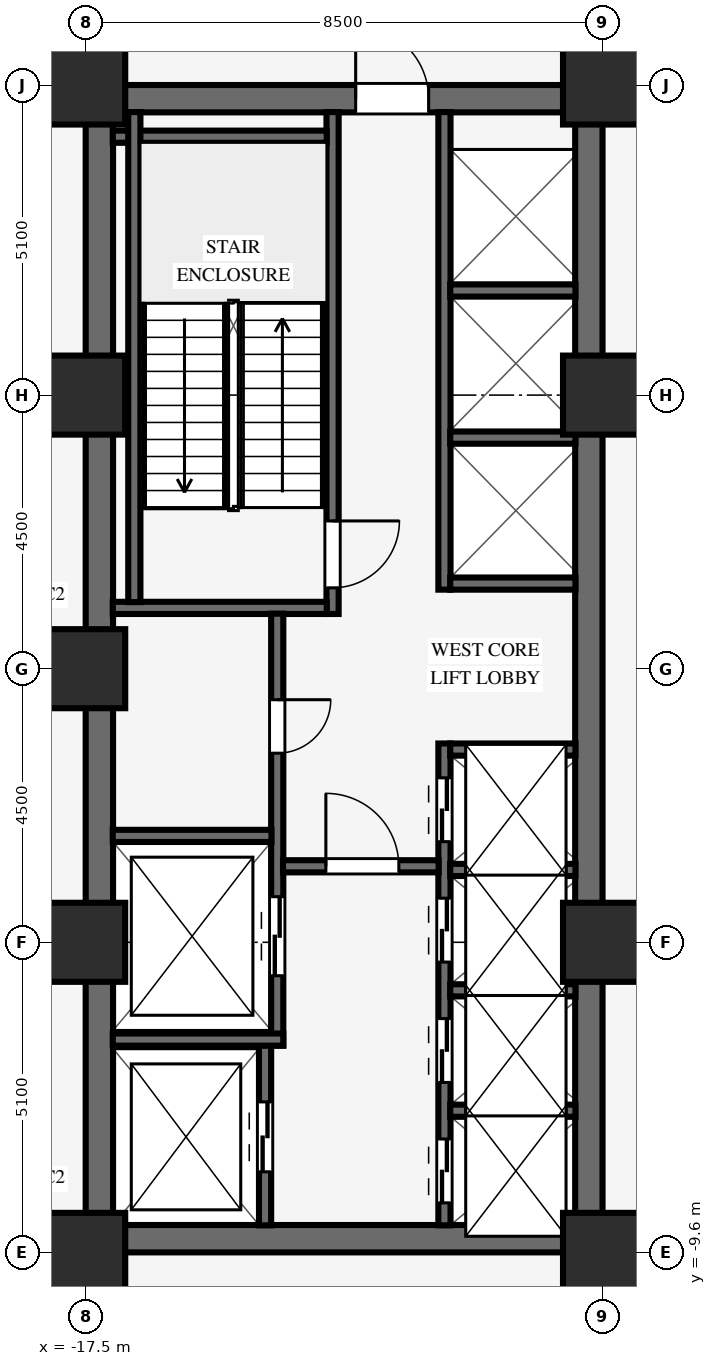
"""IFC4 building model, lengths in metres.
Left out: names, types, materials, properties, quantities, classifications, styles, units other than length and angle.
Written with IfcOpenShell. Run it as: python <this file> out.ifc"""

import sys

from ifc_helpers import new_model, si_unit, direction, frame, frame_2d, origin, origin_2d, place, context, subcontext, project, spatial, rectangle, extrude, source, transform, mapped, element, fill, save


model = new_model("IFC4")
c1 = context("Model", 3, precision=1e-05, world=origin(), true_north=direction((0.0, 1.0)))
c2 = subcontext(c1, "Body", "Model", "MODEL_VIEW")
j1 = project(units=[si_unit("LENGTHUNIT", "METRE"), si_unit("PLANEANGLEUNIT", "RADIAN")], contexts=[c1])
p1 = place(None, origin())
s1 = spatial("IfcSite", under=j1, at=p1, CompositionType="ELEMENT")
p2 = place(p1, origin())
s2 = spatial("IfcBuilding", under=s1, at=p2, CompositionType="ELEMENT")
p3 = place(p2, frame((0.0, 0.0, 13.8)))
s3 = spatial("IfcBuildingStorey", under=s2, at=p3, CompositionType="ELEMENT", Elevation=13.8)
p4 = place(p3, frame((-17.5, -9.375, 0.0), z_axis=(0.0, 0.0, 1.0), x_axis=(1.0, 0.0, 0.0)))
e1 = element("IfcWall", 1, at=p4, inside=s3, PredefinedType="SHEAR", context=c2, shape_type="SweptSolid", body=[
    extrude(rectangle(XDim=8.5, YDim=0.45, at=frame_2d((4.25, 0.0))), origin(), (0.0, 0.0, 1.0), 4.2),
])
p5 = place(p3, frame((-17.5, 9.375, 0.0), z_axis=(0.0, 0.0, 1.0), x_axis=(1.0, 0.0, 0.0)))
e2 = element("IfcWall", 2, at=p5, inside=s3, PredefinedType="SHEAR", context=c2, shape_type="SweptSolid", body=[
    extrude(rectangle(XDim=8.5, YDim=0.45, at=frame_2d((4.25, 0.0))), origin(), (0.0, 0.0, 1.0), 4.2),
])
p6 = place(p5, frame((4.44, 0.0, 0.0)))
e3 = element("IfcOpeningElement", 3, at=p6, cuts=e2, PredefinedType="OPENING", context=c2, shape_type="SweptSolid", body=[
    extrude(rectangle(XDim=1.2, YDim=2.15, at=frame_2d((0.6, 1.075))), frame((0.0, 0.235, 0.0), z_axis=(0.0, -1.0, 0.0), x_axis=(1.0, 0.0, 0.0)), (0.0, 0.0, 1.0), 0.47),
])
for number, where, z_axis, x_axis in (
    (4, (-17.275, -9.155, 0.0), (0.0, 0.0, 1.0), (0.0, 1.0, 0.0)),
    (5, (-9.225, -9.155, 0.0), (0.0, 0.0, 1.0), (0.0, 1.0, 0.0)),
):
    element("IfcWall", number, at=place(p3, frame(where, z_axis=z_axis, x_axis=x_axis)), inside=s3, PredefinedType="SHEAR", context=c2, shape_type="SweptSolid", body=[
        extrude(rectangle(XDim=18.31, YDim=0.45, at=frame_2d((9.155, 0.0))), origin(), (0.0, 0.0, 1.0), 4.2),
    ])
for number, where, z_axis, x_axis in (
    (6, (-17.5, -9.6, 0.0), (0.0, 0.0, 1.0), (1.0, 0.0, 0.0)),
    (7, (-17.5, -4.5, 0.0), (0.0, 0.0, 1.0), (1.0, 0.0, 0.0)),
    (8, (-17.5, 4.5, 0.0), (0.0, 0.0, 1.0), (1.0, 0.0, 0.0)),
    (9, (-17.5, 9.6, 0.0), (0.0, 0.0, 1.0), (1.0, 0.0, 0.0)),
    (10, (-9.0, -9.6, 0.0), (0.0, 0.0, 1.0), (1.0, 0.0, 0.0)),
    (11, (-9.0, -4.5, 0.0), (0.0, 0.0, 1.0), (1.0, 0.0, 0.0)),
    (12, (-9.0, 4.5, 0.0), (0.0, 0.0, 1.0), (1.0, 0.0, 0.0)),
    (13, (-9.0, 9.6, 0.0), (0.0, 0.0, 1.0), (1.0, 0.0, 0.0)),
    (14, (-17.5, 0.0, 0.0), (0.0, 0.0, 1.0), (1.0, 0.0, 0.0)),
):
    element("IfcColumn", number, at=place(p3, frame(where, z_axis=z_axis, x_axis=x_axis)), inside=s3, PredefinedType="COLUMN", context=c2, shape_type="SweptSolid", body=[
        extrude(rectangle(XDim=1.3, YDim=1.3, at=origin_2d()), origin(), (0.0, 0.0, 1.0), 4.2),
    ])
p7 = place(p3, frame((-13.44, 0.9, 0.0), z_axis=(0.0, 0.0, 1.0), x_axis=(0.0, 1.0, 0.0)))
e15 = element("IfcWall", 15, at=p7, inside=s3, PredefinedType="SHEAR", context=c2, shape_type="SweptSolid", body=[
    extrude(rectangle(XDim=8.255, YDim=0.2, at=frame_2d((4.127, 0.0))), origin(), (0.0, 0.0, 1.0), 4.2),
])
p8 = place(p7, frame((1.53, 0.0, 0.0), z_axis=(0.0, 0.0, 1.0), x_axis=(-1.0, 0.0, 0.0)))
e16 = element("IfcOpeningElement", 16, at=p8, cuts=e15, PredefinedType="OPENING", context=c2, shape_type="SweptSolid", body=[
    extrude(rectangle(XDim=1.1, YDim=2.15, at=frame_2d((0.55, 1.075))), frame((0.0, 0.11, 0.0), z_axis=(0.0, -1.0, 0.0), x_axis=(1.0, 0.0, 0.0)), (0.0, 0.0, 1.0), 0.22),
])
for number, where, z_axis, x_axis in (
    (17, (-17.055, 1.0, 0.0), (0.0, 0.0, 1.0), (1.0, 0.0, 0.0)),
    (18, (-17.055, 8.75, 0.0), (0.0, 0.0, 1.0), (1.0, 0.0, 0.0)),
):
    element("IfcWall", number, at=place(p3, frame(where, z_axis=z_axis, x_axis=x_axis)), inside=s3, PredefinedType="SHEAR", context=c2, shape_type="SweptSolid", body=[
        extrude(rectangle(XDim=3.52, YDim=0.2, at=frame_2d((1.76, 0.0))), origin(), (0.0, 0.0, 1.0), 4.2),
    ])
p9 = place(p3, frame((-16.7, 1.095, 0.0), z_axis=(0.0, 0.0, 1.0), x_axis=(0.0, 1.0, 0.0)))
e19 = element("IfcWall", 19, at=p9, inside=s3, PredefinedType="SHEAR", context=c2, shape_type="SweptSolid", body=[
    extrude(rectangle(XDim=8.06, YDim=0.2, at=frame_2d((4.03, 0.0))), origin(), (0.0, 0.0, 1.0), 4.2),
])
p10 = place(p3, frame((-14.55, -9.155, 0.0), z_axis=(0.0, 0.0, 1.0), x_axis=(0.0, 1.0, 0.0)))
e20 = element("IfcWall", 20, at=p10, inside=s3, PredefinedType="SHEAR", context=c2, shape_type="SweptSolid", body=[
    extrude(rectangle(XDim=2.96, YDim=0.2, at=frame_2d((1.48, 0.0))), origin(), (0.0, 0.0, 1.0), 4.2),
])
p11 = place(p10, frame((0.88, 0.0, 0.0)))
e21 = element("IfcOpeningElement", 21, at=p11, cuts=e20, PredefinedType="OPENING", context=c2, shape_type="SweptSolid", body=[
    extrude(rectangle(XDim=1.15, YDim=2.15, at=frame_2d((0.575, 1.075))), frame((0.0, 0.11, 0.0), z_axis=(0.0, -1.0, 0.0), x_axis=(1.0, 0.0, 0.0)), (0.0, 0.0, 1.0), 0.22),
])
p12 = place(p3, frame((-14.35, -6.2, 0.0), z_axis=(0.0, 0.0, 1.0), x_axis=(0.0, 1.0, 0.0)))
e22 = element("IfcWall", 22, at=p12, inside=s3, PredefinedType="SHEAR", context=c2, shape_type="SweptSolid", body=[
    extrude(rectangle(XDim=7.105, YDim=0.2, at=frame_2d((3.552, 0.0))), origin(), (0.0, 0.0, 1.0), 4.2),
])
p13 = place(p12, frame((5.69, 0.0, 0.0), z_axis=(0.0, 0.0, 1.0), x_axis=(-1.0, 0.0, 0.0)))
e23 = element("IfcOpeningElement", 23, at=p13, cuts=e22, PredefinedType="OPENING", context=c2, shape_type="SweptSolid", body=[
    extrude(rectangle(XDim=0.88, YDim=2.1, at=frame_2d((0.44, 1.05))), frame((0.0, 0.11, 0.0), z_axis=(0.0, -1.0, 0.0), x_axis=(1.0, 0.0, 0.0)), (0.0, 0.0, 1.0), 0.22),
])
p14 = place(p12, frame((1.15, 0.0, 0.0)))
e24 = element("IfcOpeningElement", 24, at=p14, cuts=e22, PredefinedType="OPENING", context=c2, shape_type="SweptSolid", body=[
    extrude(rectangle(XDim=1.3, YDim=2.2, at=frame_2d((0.65, 1.1))), frame((0.0, 0.11, 0.0), z_axis=(0.0, -1.0, 0.0), x_axis=(1.0, 0.0, 0.0)), (0.0, 0.0, 1.0), 0.22),
])
p15 = place(p3, frame((-17.055, -6.1, 0.0), z_axis=(0.0, 0.0, 1.0), x_axis=(1.0, 0.0, 0.0)))
e25 = element("IfcWall", 25, at=p15, inside=s3, PredefinedType="SHEAR", context=c2, shape_type="SweptSolid", body=[
    extrude(rectangle(XDim=2.805, YDim=0.2, at=frame_2d((1.402, 0.0))), origin(), (0.0, 0.0, 1.0), 4.2),
])
p16 = place(p3, frame((-17.055, -2.75, 0.0), z_axis=(0.0, 0.0, 1.0), x_axis=(1.0, 0.0, 0.0)))
e26 = element("IfcWall", 26, at=p16, inside=s3, PredefinedType="SHEAR", context=c2, shape_type="SweptSolid", body=[
    extrude(rectangle(XDim=2.61, YDim=0.2, at=frame_2d((1.305, 0.0))), origin(), (0.0, 0.0, 1.0), 4.2),
])
p17 = place(p3, frame((-11.6, -9.155, 0.0), z_axis=(0.0, 0.0, 1.0), x_axis=(0.0, 1.0, 0.0)))
e27 = element("IfcWall", 27, at=p17, inside=s3, PredefinedType="SHEAR", context=c2, shape_type="SweptSolid", body=[
    extrude(rectangle(XDim=7.925, YDim=0.2, at=frame_2d((3.962, 0.0))), origin(), (0.0, 0.0, 1.0), 4.2),
])
p18 = place(p17, frame((0.37, 0.0, 0.0)))
e28 = element("IfcOpeningElement", 28, at=p18, cuts=e27, PredefinedType="OPENING", context=c2, shape_type="SweptSolid", body=[
    extrude(rectangle(XDim=1.05, YDim=2.15, at=frame_2d((0.525, 1.075))), frame((0.0, 0.11, 0.0), z_axis=(0.0, -1.0, 0.0), x_axis=(1.0, 0.0, 0.0)), (0.0, 0.0, 1.0), 0.22),
])
p19 = place(p17, frame((2.35, 0.0, 0.0)))
e29 = element("IfcOpeningElement", 29, at=p19, cuts=e27, PredefinedType="OPENING", context=c2, shape_type="SweptSolid", body=[
    extrude(rectangle(XDim=1.05, YDim=2.15, at=frame_2d((0.525, 1.075))), frame((0.0, 0.11, 0.0), z_axis=(0.0, -1.0, 0.0), x_axis=(1.0, 0.0, 0.0)), (0.0, 0.0, 1.0), 0.22),
])
p20 = place(p17, frame((4.33, 0.0, 0.0)))
e30 = element("IfcOpeningElement", 30, at=p20, cuts=e27, PredefinedType="OPENING", context=c2, shape_type="SweptSolid", body=[
    extrude(rectangle(XDim=1.05, YDim=2.15, at=frame_2d((0.525, 1.075))), frame((0.0, 0.11, 0.0), z_axis=(0.0, -1.0, 0.0), x_axis=(1.0, 0.0, 0.0)), (0.0, 0.0, 1.0), 0.22),
])
p21 = place(p17, frame((6.31, 0.0, 0.0)))
e31 = element("IfcOpeningElement", 31, at=p21, cuts=e27, PredefinedType="OPENING", context=c2, shape_type="SweptSolid", body=[
    extrude(rectangle(XDim=1.05, YDim=2.15, at=frame_2d((0.525, 1.075))), frame((0.0, 0.11, 0.0), z_axis=(0.0, -1.0, 0.0), x_axis=(1.0, 0.0, 0.0)), (0.0, 0.0, 1.0), 0.22),
])
p22 = place(p3, frame((-14.255, -3.25, 0.0), z_axis=(0.0, 0.0, 1.0), x_axis=(1.0, 0.0, 0.0)))
e32 = element("IfcWall", 32, at=p22, inside=s3, PredefinedType="SHEAR", context=c2, shape_type="SweptSolid", body=[
    extrude(rectangle(XDim=2.56, YDim=0.2, at=frame_2d((1.28, 0.0))), origin(), (0.0, 0.0, 1.0), 4.2),
])
p23 = place(p22, frame((0.705, 0.0, 0.0)))
e33 = element("IfcOpeningElement", 33, at=p23, cuts=e32, PredefinedType="OPENING", context=c2, shape_type="SweptSolid", body=[
    extrude(rectangle(XDim=1.2, YDim=2.15, at=frame_2d((0.6, 1.075))), frame((0.0, 0.11, 0.0), z_axis=(0.0, -1.0, 0.0), x_axis=(1.0, 0.0, 0.0)), (0.0, 0.0, 1.0), 0.22),
])
for number, where, z_axis, x_axis in (
    (34, (-11.505, -7.27, 0.0), (0.0, 0.0, 1.0), (1.0, 0.0, 0.0)),
    (35, (-11.505, -5.29, 0.0), (0.0, 0.0, 1.0), (1.0, 0.0, 0.0)),
    (36, (-11.505, -3.31, 0.0), (0.0, 0.0, 1.0), (1.0, 0.0, 0.0)),
    (37, (-11.505, -1.33, 0.0), (0.0, 0.0, 1.0), (1.0, 0.0, 0.0)),
):
    element("IfcWall", number, at=place(p3, frame(where, z_axis=z_axis, x_axis=x_axis)), inside=s3, PredefinedType="SHEAR", context=c2, shape_type="SweptSolid", body=[
        extrude(rectangle(XDim=2.06, YDim=0.2, at=frame_2d((1.03, 0.0))), origin(), (0.0, 0.0, 1.0), 4.2),
    ])
p24 = place(p3, frame((-11.6, 1.3, 0.0), z_axis=(0.0, 0.0, 1.0), x_axis=(0.0, 1.0, 0.0)))
e38 = element("IfcWall", 38, at=p24, inside=s3, PredefinedType="SHEAR", context=c2, shape_type="SweptSolid", body=[
    extrude(rectangle(XDim=7.855, YDim=0.2, at=frame_2d((3.927, 0.0))), origin(), (0.0, 0.0, 1.0), 4.2),
])
for number, where, z_axis, x_axis in (
    (39, (-11.505, 1.4, 0.0), (0.0, 0.0, 1.0), (1.0, 0.0, 0.0)),
    (40, (-11.505, 3.8, 0.0), (0.0, 0.0, 1.0), (1.0, 0.0, 0.0)),
    (41, (-11.505, 6.22, 0.0), (0.0, 0.0, 1.0), (1.0, 0.0, 0.0)),
):
    element("IfcWall", number, at=place(p3, frame(where, z_axis=z_axis, x_axis=x_axis)), inside=s3, PredefinedType="SHEAR", context=c2, shape_type="SweptSolid", body=[
        extrude(rectangle(XDim=2.06, YDim=0.2, at=frame_2d((1.03, 0.0))), origin(), (0.0, 0.0, 1.0), 4.2),
    ])
m1 = source(origin(), c2, "Body", "SweptSolid", [
    extrude(rectangle(XDim=1.1, YDim=2.15, at=frame_2d((0.55, 1.075))), frame((0.0, 0.025, 0.0), z_axis=(0.0, -1.0, 0.0), x_axis=(1.0, 0.0, 0.0)), (0.0, 0.0, 1.0), 0.05),
])
p25 = place(p8, origin())
e42 = element("IfcDoor", 42, at=p25, inside=s3, OperationType="SINGLE_SWING_LEFT", PredefinedType="DOOR", context=c2, shape_type="MappedRepresentation", body=[
    mapped(m1, transform((0.0, 0.0, 0.0), scale=1.0)),
])
fill(e16, e42)
m2 = source(origin(), c2, "Body", "SweptSolid", [
    extrude(rectangle(XDim=0.88, YDim=2.1, at=frame_2d((0.44, 1.05))), frame((0.0, 0.025, 0.0), z_axis=(0.0, -1.0, 0.0), x_axis=(1.0, 0.0, 0.0)), (0.0, 0.0, 1.0), 0.05),
])
p26 = place(p13, origin())
e43 = element("IfcDoor", 43, at=p26, inside=s3, OperationType="SINGLE_SWING_LEFT", PredefinedType="DOOR", context=c2, shape_type="MappedRepresentation", body=[
    mapped(m2, transform((0.0, 0.0, 0.0), scale=1.0)),
])
fill(e23, e43)
m3 = source(origin(), c2, "Body", "SweptSolid", [
    extrude(rectangle(XDim=1.2, YDim=2.15, at=frame_2d((0.6, 1.075))), frame((0.0, 0.025, 0.0), z_axis=(0.0, -1.0, 0.0), x_axis=(1.0, 0.0, 0.0)), (0.0, 0.0, 1.0), 0.05),
])
p27 = place(p23, origin())
e44 = element("IfcDoor", 44, at=p27, inside=s3, OperationType="SINGLE_SWING_LEFT", PredefinedType="DOOR", context=c2, shape_type="MappedRepresentation", body=[
    mapped(m3, transform((0.0, 0.0, 0.0), scale=1.0)),
])
fill(e33, e44)
p28 = place(p6, origin())
e45 = element("IfcDoor", 45, at=p28, inside=s3, OperationType="SINGLE_SWING_LEFT", PredefinedType="DOOR", context=c2, shape_type="MappedRepresentation", body=[
    mapped(m3, transform((0.0, 0.0, 0.0), scale=1.0)),
])
fill(e3, e45)
m4 = source(origin(), c2, "Body", "SweptSolid", [
    extrude(rectangle(XDim=1.15, YDim=2.15, at=frame_2d((0.575, 1.075))), frame((0.0, 0.025, 0.0), z_axis=(0.0, -1.0, 0.0), x_axis=(1.0, 0.0, 0.0)), (0.0, 0.0, 1.0), 0.05),
])
p29 = place(p11, origin())
e46 = element("IfcDoor", 46, at=p29, inside=s3, OperationType="DOUBLE_DOOR_SLIDING", PredefinedType="DOOR", context=c2, shape_type="MappedRepresentation", body=[
    mapped(m4, transform((0.0, 0.0, 0.0), scale=1.0)),
])
fill(e21, e46)
m5 = source(origin(), c2, "Body", "SweptSolid", [
    extrude(rectangle(XDim=1.3, YDim=2.2, at=frame_2d((0.65, 1.1))), frame((0.0, 0.025, 0.0), z_axis=(0.0, -1.0, 0.0), x_axis=(1.0, 0.0, 0.0)), (0.0, 0.0, 1.0), 0.05),
])
p30 = place(p14, origin())
e47 = element("IfcDoor", 47, at=p30, inside=s3, OperationType="DOUBLE_DOOR_SLIDING", PredefinedType="DOOR", context=c2, shape_type="MappedRepresentation", body=[
    mapped(m5, transform((0.0, 0.0, 0.0), scale=1.0)),
])
fill(e24, e47)
m6 = source(origin(), c2, "Body", "SweptSolid", [
    extrude(rectangle(XDim=1.05, YDim=2.15, at=frame_2d((0.525, 1.075))), frame((0.0, 0.025, 0.0), z_axis=(0.0, -1.0, 0.0), x_axis=(1.0, 0.0, 0.0)), (0.0, 0.0, 1.0), 0.05),
])
p31 = place(p18, origin())
e48 = element("IfcDoor", 48, at=p31, inside=s3, OperationType="DOUBLE_DOOR_SLIDING", PredefinedType="DOOR", context=c2, shape_type="MappedRepresentation", body=[
    mapped(m6, transform((0.0, 0.0, 0.0), scale=1.0)),
])
fill(e28, e48)
p32 = place(p19, origin())
e49 = element("IfcDoor", 49, at=p32, inside=s3, OperationType="DOUBLE_DOOR_SLIDING", PredefinedType="DOOR", context=c2, shape_type="MappedRepresentation", body=[
    mapped(m6, transform((0.0, 0.0, 0.0), scale=1.0)),
])
fill(e29, e49)
p33 = place(p20, origin())
e50 = element("IfcDoor", 50, at=p33, inside=s3, OperationType="DOUBLE_DOOR_SLIDING", PredefinedType="DOOR", context=c2, shape_type="MappedRepresentation", body=[
    mapped(m6, transform((0.0, 0.0, 0.0), scale=1.0)),
])
fill(e30, e50)
p34 = place(p21, origin())
e51 = element("IfcDoor", 51, at=p34, inside=s3, OperationType="DOUBLE_DOOR_SLIDING", PredefinedType="DOOR", context=c2, shape_type="MappedRepresentation", body=[
    mapped(m6, transform((0.0, 0.0, 0.0), scale=1.0)),
])
fill(e31, e51)
save(model, sys.argv[1])
